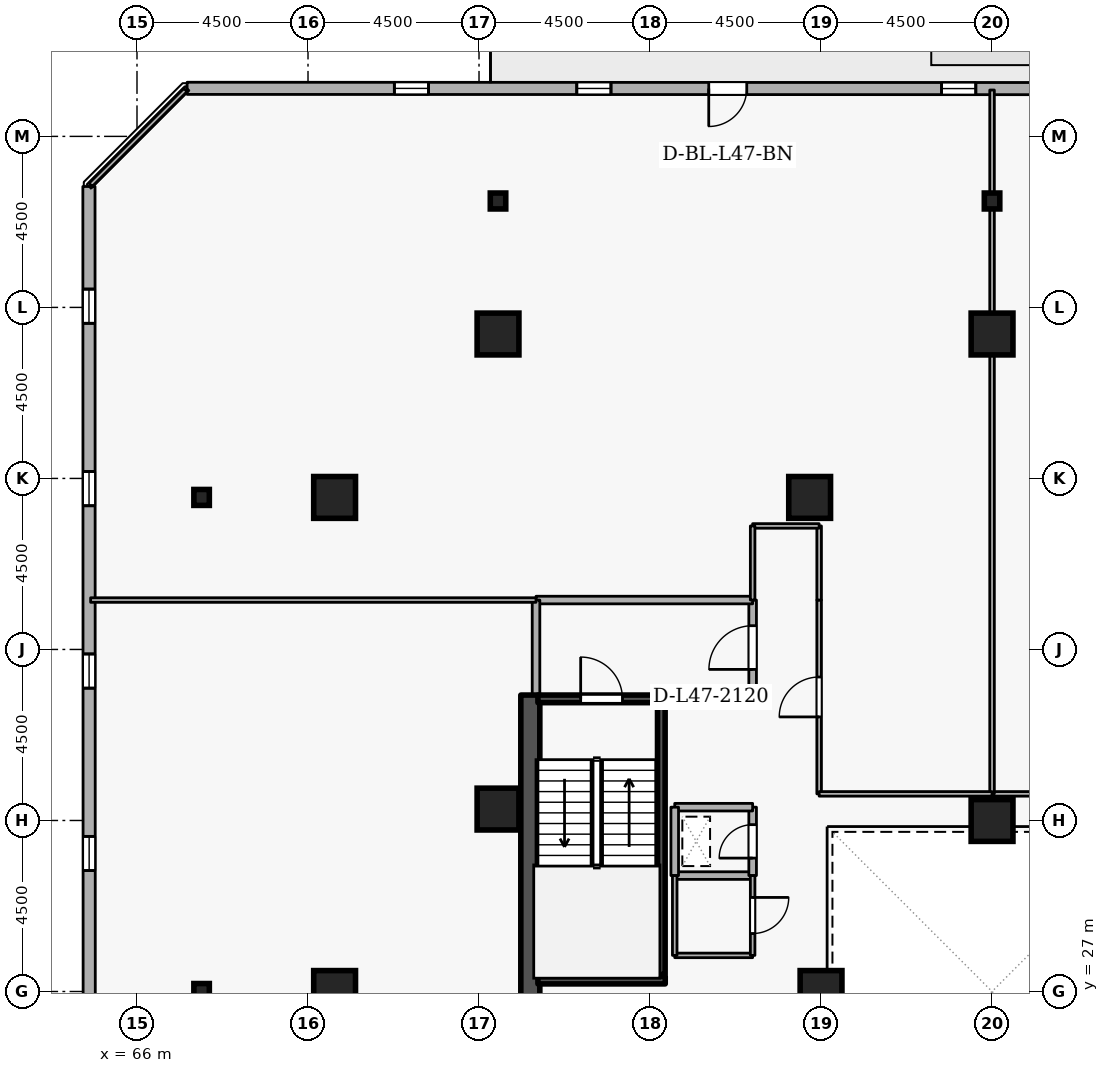
"""IFC4 building model, lengths in metres.
Left out: names, types, materials, properties, quantities, classifications, styles, units other than length and angle.
Written with IfcOpenShell. Run it as: python <this file> out.ifc"""

import sys

from ifc_helpers import new_model, si_unit, direction, frame, frame_2d, origin, origin_2d, place, context, subcontext, project, spatial, rectangle, i_section, extrude, element, fill, save


model = new_model("IFC4")
c1 = context("Model", 3, precision=1e-05, world=origin(), true_north=direction((0.0, 1.0)))
c2 = subcontext(c1, "Body", "Model", "MODEL_VIEW")
j1 = project(units=[si_unit("LENGTHUNIT", "METRE"), si_unit("PLANEANGLEUNIT", "RADIAN")], contexts=[c1])
p1 = place(None, origin())
s1 = spatial("IfcSite", under=j1, at=p1, CompositionType="ELEMENT")
p2 = place(p1, origin())
s2 = spatial("IfcBuilding", under=s1, at=p2, CompositionType="ELEMENT")
p3 = place(p2, frame((0.0, 0.0, 178.5)))
s3 = spatial("IfcBuildingStorey", under=s2, at=p3, CompositionType="ELEMENT", Elevation=178.5)
p4 = place(p3, frame((76.35, 19.2, 0.0), z_axis=(0.0, 0.0, 1.0), x_axis=(0.0, 1.0, 0.0)))
e1 = element("IfcWall", 1, at=p4, inside=s3, PredefinedType="SHEAR", context=c2, shape_type="SweptSolid", body=[
    extrude(rectangle(XDim=15.6, YDim=0.5, at=frame_2d((7.8, 0.0))), origin(), (0.0, 0.0, 1.0), 3.6),
])
for number, where, z_axis, x_axis in (
    (2, (88.5, 44.3, 0.0), (0.0, 0.0, 1.0), (1.0, 0.0, 0.0)),
    (3, (75.5, 44.3, 0.0), (0.0, 0.0, 1.0), (1.0, 0.0, 0.0)),
    (4, (71.2, 27.0, 0.0), (0.0, 0.0, 1.0), (1.0, 0.0, 0.0)),
    (5, (71.2, 40.0, 0.0), (0.0, 0.0, 1.0), (1.0, 0.0, 0.0)),
    (6, (83.7, 40.0, 0.0), (0.0, 0.0, 1.0), (1.0, 0.0, 0.0)),
    (7, (75.5, 31.8, 0.0), (0.0, 0.0, 1.0), (1.0, 0.0, 0.0)),
    (8, (84.0, 27.0, 0.0), (0.0, 0.0, 1.0), (1.0, 0.0, 0.0)),
    (9, (88.5, 31.5, 0.0), (0.0, 0.0, 1.0), (1.0, 0.0, 0.0)),
):
    element("IfcColumn", number, at=place(p3, frame(where, z_axis=z_axis, x_axis=x_axis)), inside=s3, PredefinedType="COLUMN", context=c2, shape_type="SweptSolid", body=[
        extrude(rectangle(XDim=1.1, YDim=1.1, at=origin_2d()), origin(), (0.0, 0.0, 1.0), 3.6),
    ])
for number, where, z_axis, x_axis in (
    (10, (88.5, 47.8, 0.0), (0.0, 0.0, 1.0), (1.0, 0.0, 0.0)),
    (11, (75.5, 47.8, 0.0), (0.0, 0.0, 1.0), (1.0, 0.0, 0.0)),
    (12, (67.7, 27.0, 0.0), (0.0, 0.0, 1.0), (1.0, 0.0, 0.0)),
    (13, (67.7, 40.0, 0.0), (0.0, 0.0, 1.0), (1.0, 0.0, 0.0)),
):
    element("IfcColumn", number, at=place(p3, frame(where, z_axis=z_axis, x_axis=x_axis)), inside=s3, PredefinedType="COLUMN", context=c2, shape_type="SweptSolid", body=[
        extrude(i_section(OverallWidth=0.407, OverallDepth=0.419, WebThickness=0.031, FlangeThickness=0.049, FilletRadius=0.015, at=origin_2d()), origin(), (0.0, 0.0, 1.0), 3.6),
    ])
p5 = place(p3, frame((100.372, 50.754, 0.0), z_axis=(0.0, 0.0, 1.0), x_axis=(-0.999999944762, 0.000332378036, 0.0)))
e14 = element("IfcWall", 14, at=p5, inside=s3, PredefinedType="STANDARD", context=c2, shape_type="SweptSolid", body=[
    extrude(rectangle(XDim=33.054, YDim=0.32, at=frame_2d((16.527, 0.0))), origin(), (0.0, 0.0, 1.0), 2.7),
])
p6 = place(p5, frame((18.327, 0.0, 0.0)))
e15 = element("IfcOpeningElement", 15, at=p6, cuts=e14, PredefinedType="OPENING", context=c2, shape_type="SweptSolid", body=[
    extrude(rectangle(XDim=1.0, YDim=2.08, at=frame_2d((0.5, 1.04))), frame((0.0, 0.17, 0.0), z_axis=(0.0, -1.0, 0.0), x_axis=(1.0, 0.0, 0.0)), (0.0, 0.0, 1.0), 0.34),
])
p7 = place(p5, frame((2.7, 0.0, 0.72)))
e16 = element("IfcOpeningElement", 16, at=p7, cuts=e14, PredefinedType="OPENING", context=c2, shape_type="SweptSolid", body=[
    extrude(rectangle(XDim=0.9, YDim=1.75, at=frame_2d((0.45, 0.875))), frame((0.0, 0.17, 0.0), z_axis=(0.0, -1.0, 0.0), x_axis=(1.0, 0.0, 0.0)), (0.0, 0.0, 1.0), 0.34),
])
p8 = place(p5, frame((7.5, 0.0, 0.72)))
e17 = element("IfcOpeningElement", 17, at=p8, cuts=e14, PredefinedType="OPENING", context=c2, shape_type="SweptSolid", body=[
    extrude(rectangle(XDim=0.9, YDim=1.75, at=frame_2d((0.45, 0.875))), frame((0.0, 0.17, 0.0), z_axis=(0.0, -1.0, 0.0), x_axis=(1.0, 0.0, 0.0)), (0.0, 0.0, 1.0), 0.34),
])
p9 = place(p5, frame((12.3, 0.0, 0.72)))
e18 = element("IfcOpeningElement", 18, at=p9, cuts=e14, PredefinedType="OPENING", context=c2, shape_type="SweptSolid", body=[
    extrude(rectangle(XDim=0.9, YDim=1.75, at=frame_2d((0.45, 0.875))), frame((0.0, 0.17, 0.0), z_axis=(0.0, -1.0, 0.0), x_axis=(1.0, 0.0, 0.0)), (0.0, 0.0, 1.0), 0.34),
])
p10 = place(p5, frame((21.9, 0.0, 0.72)))
e19 = element("IfcOpeningElement", 19, at=p10, cuts=e14, PredefinedType="OPENING", context=c2, shape_type="SweptSolid", body=[
    extrude(rectangle(XDim=0.9, YDim=1.75, at=frame_2d((0.45, 0.875))), frame((0.0, 0.17, 0.0), z_axis=(0.0, -1.0, 0.0), x_axis=(1.0, 0.0, 0.0)), (0.0, 0.0, 1.0), 0.34),
])
p11 = place(p5, frame((26.7, 0.0, 0.72)))
e20 = element("IfcOpeningElement", 20, at=p11, cuts=e14, PredefinedType="OPENING", context=c2, shape_type="SweptSolid", body=[
    extrude(rectangle(XDim=0.9, YDim=1.75, at=frame_2d((0.45, 0.875))), frame((0.0, 0.17, 0.0), z_axis=(0.0, -1.0, 0.0), x_axis=(1.0, 0.0, 0.0)), (0.0, 0.0, 1.0), 0.34),
])
p12 = place(p3, frame((64.735, 48.181, 0.0), z_axis=(0.0, 0.0, 1.0), x_axis=(0.000332378036, -0.999999944762, 0.0)))
e21 = element("IfcWall", 21, at=p12, inside=s3, PredefinedType="STANDARD", context=c2, shape_type="SweptSolid", body=[
    extrude(rectangle(XDim=33.054, YDim=0.32, at=frame_2d((16.527, 0.0))), origin(), (0.0, 0.0, 1.0), 2.7),
])
p13 = place(p12, frame((2.7, 0.0, 0.72)))
e22 = element("IfcOpeningElement", 22, at=p13, cuts=e21, PredefinedType="OPENING", context=c2, shape_type="SweptSolid", body=[
    extrude(rectangle(XDim=0.9, YDim=1.75, at=frame_2d((0.45, 0.875))), frame((0.0, 0.17, 0.0), z_axis=(0.0, -1.0, 0.0), x_axis=(1.0, 0.0, 0.0)), (0.0, 0.0, 1.0), 0.34),
])
p14 = place(p12, frame((7.5, 0.0, 0.72)))
e23 = element("IfcOpeningElement", 23, at=p14, cuts=e21, PredefinedType="OPENING", context=c2, shape_type="SweptSolid", body=[
    extrude(rectangle(XDim=0.9, YDim=1.75, at=frame_2d((0.45, 0.875))), frame((0.0, 0.17, 0.0), z_axis=(0.0, -1.0, 0.0), x_axis=(1.0, 0.0, 0.0)), (0.0, 0.0, 1.0), 0.34),
])
p15 = place(p12, frame((12.3, 0.0, 0.72)))
e24 = element("IfcOpeningElement", 24, at=p15, cuts=e21, PredefinedType="OPENING", context=c2, shape_type="SweptSolid", body=[
    extrude(rectangle(XDim=0.9, YDim=1.75, at=frame_2d((0.45, 0.875))), frame((0.0, 0.17, 0.0), z_axis=(0.0, -1.0, 0.0), x_axis=(1.0, 0.0, 0.0)), (0.0, 0.0, 1.0), 0.34),
])
p16 = place(p12, frame((17.1, 0.0, 0.72)))
e25 = element("IfcOpeningElement", 25, at=p16, cuts=e21, PredefinedType="OPENING", context=c2, shape_type="SweptSolid", body=[
    extrude(rectangle(XDim=0.9, YDim=1.75, at=frame_2d((0.45, 0.875))), frame((0.0, 0.17, 0.0), z_axis=(0.0, -1.0, 0.0), x_axis=(1.0, 0.0, 0.0)), (0.0, 0.0, 1.0), 0.34),
])
p17 = place(p12, frame((21.9, 0.0, 0.72)))
e26 = element("IfcOpeningElement", 26, at=p17, cuts=e21, PredefinedType="OPENING", context=c2, shape_type="SweptSolid", body=[
    extrude(rectangle(XDim=0.9, YDim=1.75, at=frame_2d((0.45, 0.875))), frame((0.0, 0.17, 0.0), z_axis=(0.0, -1.0, 0.0), x_axis=(1.0, 0.0, 0.0)), (0.0, 0.0, 1.0), 0.34),
])
p18 = place(p12, frame((26.7, 0.0, 0.72)))
e27 = element("IfcOpeningElement", 27, at=p18, cuts=e21, PredefinedType="OPENING", context=c2, shape_type="SweptSolid", body=[
    extrude(rectangle(XDim=0.9, YDim=1.75, at=frame_2d((0.45, 0.875))), frame((0.0, 0.17, 0.0), z_axis=(0.0, -1.0, 0.0), x_axis=(1.0, 0.0, 0.0)), (0.0, 0.0, 1.0), 0.34),
])
p19 = place(p3, frame((76.55, 34.7, 0.0), z_axis=(0.0, 0.0, 1.0), x_axis=(1.0, 0.0, 0.0)))
e28 = element("IfcWall", 28, at=p19, inside=s3, PredefinedType="SHEAR", context=c2, shape_type="SweptSolid", body=[
    extrude(rectangle(XDim=3.35, YDim=0.2, at=frame_2d((1.675, 0.0))), origin(), (0.0, 0.0, 1.0), 3.6),
])
p20 = place(p19, frame((1.125, 0.0, 0.0)))
e29 = element("IfcOpeningElement", 29, at=p20, cuts=e28, PredefinedType="OPENING", context=c2, shape_type="SweptSolid", body=[
    extrude(rectangle(XDim=1.1, YDim=2.1, at=frame_2d((0.55, 1.05))), frame((0.0, 0.11, 0.0), z_axis=(0.0, -1.0, 0.0), x_axis=(1.0, 0.0, 0.0)), (0.0, 0.0, 1.0), 0.22),
])
p21 = place(p3, frame((79.9, 27.3, 0.0), z_axis=(0.0, 0.0, 1.0), x_axis=(-1.0, 0.0, 0.0)))
e30 = element("IfcWall", 30, at=p21, inside=s3, PredefinedType="SHEAR", context=c2, shape_type="SweptSolid", body=[
    extrude(rectangle(XDim=3.35, YDim=0.2, at=frame_2d((1.675, 0.0))), origin(), (0.0, 0.0, 1.0), 3.6),
])
p22 = place(p3, frame((79.797, 27.45, 0.0), z_axis=(0.0, 0.0, 1.0), x_axis=(0.0, 1.0, 0.0)))
e31 = element("IfcWall", 31, at=p22, inside=s3, PredefinedType="SHEAR", context=c2, shape_type="SweptSolid", body=[
    extrude(rectangle(XDim=7.1, YDim=0.2, at=frame_2d((3.55, 0.0))), origin(), (0.0, 0.0, 1.0), 3.6),
])
p23 = place(p3, frame((79.9, 34.8, 0.0), z_axis=(0.0, 0.0, 1.0), x_axis=(1.0, 0.0, 0.0)))
e32 = element("IfcWall", 32, at=p23, inside=s3, PredefinedType="STANDARD", context=c2, shape_type="SweptSolid", body=[
    extrude(rectangle(XDim=2.3, YDim=0.2, at=frame_2d((1.15, 0.0))), origin(), (0.0, 0.0, 1.0), 2.545),
])
p24 = place(p3, frame((82.2, 34.8, 0.0), z_axis=(0.0, 0.0, 1.0), x_axis=(0.0, 1.0, 0.0)))
e33 = element("IfcWall", 33, at=p24, inside=s3, PredefinedType="STANDARD", context=c2, shape_type="SweptSolid", body=[
    extrude(rectangle(XDim=2.5, YDim=0.2, at=frame_2d((1.25, 0.0))), origin(), (0.0, 0.0, 1.0), 3.34),
])
p25 = place(p24, frame((0.675, 0.0, 0.0)))
e34 = element("IfcOpeningElement", 34, at=p25, cuts=e33, PredefinedType="OPENING", context=c2, shape_type="SweptSolid", body=[
    extrude(rectangle(XDim=1.15, YDim=2.1, at=frame_2d((0.575, 1.05))), frame((0.0, 0.11, 0.0), z_axis=(0.0, -1.0, 0.0), x_axis=(1.0, 0.0, 0.0)), (0.0, 0.0, 1.0), 0.22),
])
p26 = place(p3, frame((82.2, 37.3, 0.0), z_axis=(0.0, 0.0, 1.0), x_axis=(-1.0, 0.0, 0.0)))
e35 = element("IfcWall", 35, at=p26, inside=s3, PredefinedType="STANDARD", context=c2, shape_type="SweptSolid", body=[
    extrude(rectangle(XDim=5.7, YDim=0.2, at=frame_2d((2.85, 0.0))), origin(), (0.0, 0.0, 1.0), 3.34),
])
p27 = place(p3, frame((76.5, 37.3, 0.0), z_axis=(0.0, 0.0, 1.0), x_axis=(0.0, -1.0, 0.0)))
e36 = element("IfcWall", 36, at=p27, inside=s3, PredefinedType="STANDARD", context=c2, shape_type="SweptSolid", body=[
    extrude(rectangle(XDim=2.5, YDim=0.2, at=frame_2d((1.25, 0.0))), origin(), (0.0, 0.0, 1.0), 3.34),
])
p28 = place(p3, frame((80.15, 30.05, 0.0), z_axis=(0.0, 0.0, 1.0), x_axis=(1.0, 0.0, 0.0)))
e37 = element("IfcWall", 37, at=p28, inside=s3, PredefinedType="STANDARD", context=c2, shape_type="SweptSolid", body=[
    extrude(rectangle(XDim=2.05, YDim=0.2, at=frame_2d((1.025, 0.0))), origin(), (0.0, 0.0, 1.0), 3.34),
])
p29 = place(p3, frame((82.2, 30.05, 0.0), z_axis=(0.0, 0.0, 1.0), x_axis=(0.0, 1.0, 0.0)))
e38 = element("IfcWall", 38, at=p29, inside=s3, PredefinedType="STANDARD", context=c2, shape_type="SweptSolid", body=[
    extrude(rectangle(XDim=1.8, YDim=0.2, at=frame_2d((0.9, 0.0))), origin(), (0.0, 0.0, 1.0), 3.34),
])
p30 = place(p29, frame((0.46, 0.0, 0.0)))
e39 = element("IfcOpeningElement", 39, at=p30, cuts=e38, PredefinedType="OPENING", context=c2, shape_type="SweptSolid", body=[
    extrude(rectangle(XDim=0.88, YDim=2.04, at=frame_2d((0.44, 1.02))), frame((0.0, 0.11, 0.0), z_axis=(0.0, -1.0, 0.0), x_axis=(1.0, 0.0, 0.0)), (0.0, 0.0, 1.0), 0.22),
])
p31 = place(p3, frame((82.2, 31.85, 0.0), z_axis=(0.0, 0.0, 1.0), x_axis=(-1.0, 0.0, 0.0)))
e40 = element("IfcWall", 40, at=p31, inside=s3, PredefinedType="STANDARD", context=c2, shape_type="SweptSolid", body=[
    extrude(rectangle(XDim=2.05, YDim=0.2, at=frame_2d((1.025, 0.0))), origin(), (0.0, 0.0, 1.0), 3.34),
])
p32 = place(p3, frame((80.15, 31.85, 0.0), z_axis=(0.0, 0.0, 1.0), x_axis=(0.0, -1.0, 0.0)))
e41 = element("IfcWall", 41, at=p32, inside=s3, PredefinedType="STANDARD", context=c2, shape_type="SweptSolid", body=[
    extrude(rectangle(XDim=1.8, YDim=0.2, at=frame_2d((0.9, 0.0))), origin(), (0.0, 0.0, 1.0), 3.34),
])
p33 = place(p3, frame((82.2, 27.95, 0.0), z_axis=(0.0, 0.0, 1.0), x_axis=(-1.0, 0.0, 0.0)))
e42 = element("IfcWall", 42, at=p33, inside=s3, PredefinedType="PARTITIONING", context=c2, shape_type="SweptSolid", body=[
    extrude(rectangle(XDim=2.05, YDim=0.12, at=frame_2d((1.025, 0.0))), origin(), (0.0, 0.0, 1.0), 3.34),
])
p34 = place(p3, frame((80.15, 27.95, 0.0), z_axis=(0.0, 0.0, 1.0), x_axis=(0.0, 1.0, 0.0)))
e43 = element("IfcWall", 43, at=p34, inside=s3, PredefinedType="PARTITIONING", context=c2, shape_type="SweptSolid", body=[
    extrude(rectangle(XDim=2.1, YDim=0.12, at=frame_2d((1.05, 0.0))), origin(), (0.0, 0.0, 1.0), 3.34),
])
p35 = place(p3, frame((82.2, 30.05, 0.0), z_axis=(0.0, 0.0, 1.0), x_axis=(0.0, -1.0, 0.0)))
e44 = element("IfcWall", 44, at=p35, inside=s3, PredefinedType="PARTITIONING", context=c2, shape_type="SweptSolid", body=[
    extrude(rectangle(XDim=2.1, YDim=0.12, at=frame_2d((1.05, 0.0))), origin(), (0.0, 0.0, 1.0), 3.34),
])
p36 = place(p35, frame((0.575, 0.0, 0.0)))
e45 = element("IfcOpeningElement", 45, at=p36, cuts=e44, PredefinedType="OPENING", context=c2, shape_type="SweptSolid", body=[
    extrude(rectangle(XDim=0.95, YDim=2.1, at=frame_2d((0.475, 1.05))), frame((0.0, 0.07, 0.0), z_axis=(0.0, -1.0, 0.0), x_axis=(1.0, 0.0, 0.0)), (0.0, 0.0, 1.0), 0.14),
])
p37 = place(p3, frame((93.05, 32.2, 0.0), z_axis=(0.0, 0.0, 1.0), x_axis=(-1.0, 0.0, 0.0)))
e46 = element("IfcWall", 46, at=p37, inside=s3, PredefinedType="PARTITIONING", context=c2, shape_type="SweptSolid", body=[
    extrude(rectangle(XDim=4.55, YDim=0.12, at=frame_2d((2.275, 0.0))), origin(), (0.0, 0.0, 1.0), 3.34),
])
p38 = place(p3, frame((88.5, 32.2, 0.0), z_axis=(0.0, 0.0, 1.0), x_axis=(0.0, 1.0, 0.0)))
e47 = element("IfcWall", 47, at=p38, inside=s3, PredefinedType="PARTITIONING", context=c2, shape_type="SweptSolid", body=[
    extrude(rectangle(XDim=18.52, YDim=0.12, at=frame_2d((9.26, 0.0))), origin(), (0.0, 0.0, 1.0), 2.932),
])
p39 = place(p3, frame((83.95, 32.2, 0.0), z_axis=(0.0, 0.0, 1.0), x_axis=(0.0, 1.0, 0.0)))
e48 = element("IfcWall", 48, at=p39, inside=s3, PredefinedType="PARTITIONING", context=c2, shape_type="SweptSolid", body=[
    extrude(rectangle(XDim=5.1, YDim=0.12, at=frame_2d((2.55, 0.0))), origin(), (0.0, 0.0, 1.0), 3.34),
])
p40 = place(p39, frame((2.025, 0.0, 0.0)))
e49 = element("IfcOpeningElement", 49, at=p40, cuts=e48, PredefinedType="OPENING", context=c2, shape_type="SweptSolid", body=[
    extrude(rectangle(XDim=1.05, YDim=2.1, at=frame_2d((0.525, 1.05))), frame((0.0, 0.07, 0.0), z_axis=(0.0, -1.0, 0.0), x_axis=(1.0, 0.0, 0.0)), (0.0, 0.0, 1.0), 0.14),
])
p41 = place(p3, frame((83.95, 37.3, 0.0), z_axis=(0.0, 0.0, 1.0), x_axis=(0.0, 1.0, 0.0)))
e50 = element("IfcWall", 50, at=p41, inside=s3, PredefinedType="PARTITIONING", context=c2, shape_type="SweptSolid", body=[
    extrude(rectangle(XDim=1.95, YDim=0.12, at=frame_2d((0.975, 0.0))), origin(), (0.0, 0.0, 1.0), 3.34),
])
p42 = place(p3, frame((83.95, 39.25, 0.0), z_axis=(0.0, 0.0, 1.0), x_axis=(-1.0, 0.0, 0.0)))
e51 = element("IfcWall", 51, at=p42, inside=s3, PredefinedType="PARTITIONING", context=c2, shape_type="SweptSolid", body=[
    extrude(rectangle(XDim=1.75, YDim=0.12, at=frame_2d((0.875, 0.0))), origin(), (0.0, 0.0, 1.0), 3.34),
])
p43 = place(p3, frame((82.2, 39.25, 0.0), z_axis=(0.0, 0.0, 1.0), x_axis=(0.0, -1.0, 0.0)))
e52 = element("IfcWall", 52, at=p43, inside=s3, PredefinedType="PARTITIONING", context=c2, shape_type="SweptSolid", body=[
    extrude(rectangle(XDim=1.95, YDim=0.12, at=frame_2d((0.975, 0.0))), origin(), (0.0, 0.0, 1.0), 3.34),
])
p44 = place(p3, frame((76.5, 37.3, 0.0), z_axis=(0.0, 0.0, 1.0), x_axis=(-1.0, 0.0, 0.0)))
e53 = element("IfcWall", 53, at=p44, inside=s3, PredefinedType="PARTITIONING", context=c2, shape_type="SweptSolid", body=[
    extrude(rectangle(XDim=11.72, YDim=0.12, at=frame_2d((5.86, 0.0))), origin(), (0.0, 0.0, 1.0), 3.34),
])
p45 = place(p3, frame((64.78, 48.225, 0.0), z_axis=(0.0, 0.0, 1.0), x_axis=(0.707106781187, 0.707106781187, 0.0)))
e54 = element("IfcWall", 54, at=p45, inside=s3, PredefinedType="PARTITIONING", context=c2, shape_type="SweptSolid", body=[
    extrude(rectangle(XDim=3.528, YDim=0.12, at=frame_2d((1.764, 0.0))), origin(), (0.0, 0.0, 1.0), 3.34),
])
p46 = place(p3, frame((88.5, 32.2, 0.0), z_axis=(0.0, 0.0, 1.0), x_axis=(-1.0, 0.0, 0.0)))
e55 = element("IfcWall", 55, at=p46, inside=s3, PredefinedType="PARTITIONING", context=c2, shape_type="SweptSolid", body=[
    extrude(rectangle(XDim=4.55, YDim=0.12, at=frame_2d((2.275, 0.0))), origin(), (0.0, 0.0, 1.0), 3.34),
])
p47 = place(p6, origin())
e56 = element("IfcDoor", 56, at=p47, inside=s3, OperationType="SINGLE_SWING_RIGHT", PredefinedType="DOOR", context=c2, shape_type="SweptSolid", body=[
    extrude(rectangle(XDim=1.0, YDim=2.08, at=frame_2d((0.5, 1.04))), frame((0.0, 0.025, 0.0), z_axis=(0.0, -1.0, 0.0), x_axis=(1.0, 0.0, 0.0)), (0.0, 0.0, 1.0), 0.05),
])
fill(e15, e56)
p48 = place(p9, origin())
e57 = element("IfcWindow", 57, at=p48, inside=s3, PartitioningType="SINGLE_PANEL", PredefinedType="WINDOW", context=c2, shape_type="SweptSolid", body=[
    extrude(rectangle(XDim=0.9, YDim=1.75, at=frame_2d((0.45, 0.875))), frame((0.0, 0.03, 0.0), z_axis=(0.0, -1.0, 0.0), x_axis=(1.0, 0.0, 0.0)), (0.0, 0.0, 1.0), 0.06),
])
fill(e18, e57)
p49 = place(p10, origin())
e58 = element("IfcWindow", 58, at=p49, inside=s3, PartitioningType="SINGLE_PANEL", PredefinedType="WINDOW", context=c2, shape_type="SweptSolid", body=[
    extrude(rectangle(XDim=0.9, YDim=1.75, at=frame_2d((0.45, 0.875))), frame((0.0, 0.03, 0.0), z_axis=(0.0, -1.0, 0.0), x_axis=(1.0, 0.0, 0.0)), (0.0, 0.0, 1.0), 0.06),
])
fill(e19, e58)
p50 = place(p11, origin())
e59 = element("IfcWindow", 59, at=p50, inside=s3, PartitioningType="SINGLE_PANEL", PredefinedType="WINDOW", context=c2, shape_type="SweptSolid", body=[
    extrude(rectangle(XDim=0.9, YDim=1.75, at=frame_2d((0.45, 0.875))), frame((0.0, 0.03, 0.0), z_axis=(0.0, -1.0, 0.0), x_axis=(1.0, 0.0, 0.0)), (0.0, 0.0, 1.0), 0.06),
])
fill(e20, e59)
p51 = place(p13, origin())
e60 = element("IfcWindow", 60, at=p51, inside=s3, PartitioningType="SINGLE_PANEL", PredefinedType="WINDOW", context=c2, shape_type="SweptSolid", body=[
    extrude(rectangle(XDim=0.9, YDim=1.75, at=frame_2d((0.45, 0.875))), frame((0.0, 0.03, 0.0), z_axis=(0.0, -1.0, 0.0), x_axis=(1.0, 0.0, 0.0)), (0.0, 0.0, 1.0), 0.06),
])
fill(e22, e60)
p52 = place(p14, origin())
e61 = element("IfcWindow", 61, at=p52, inside=s3, PartitioningType="SINGLE_PANEL", PredefinedType="WINDOW", context=c2, shape_type="SweptSolid", body=[
    extrude(rectangle(XDim=0.9, YDim=1.75, at=frame_2d((0.45, 0.875))), frame((0.0, 0.03, 0.0), z_axis=(0.0, -1.0, 0.0), x_axis=(1.0, 0.0, 0.0)), (0.0, 0.0, 1.0), 0.06),
])
fill(e23, e61)
p53 = place(p15, origin())
e62 = element("IfcWindow", 62, at=p53, inside=s3, PartitioningType="SINGLE_PANEL", PredefinedType="WINDOW", context=c2, shape_type="SweptSolid", body=[
    extrude(rectangle(XDim=0.9, YDim=1.75, at=frame_2d((0.45, 0.875))), frame((0.0, 0.03, 0.0), z_axis=(0.0, -1.0, 0.0), x_axis=(1.0, 0.0, 0.0)), (0.0, 0.0, 1.0), 0.06),
])
fill(e24, e62)
p54 = place(p16, origin())
e63 = element("IfcWindow", 63, at=p54, inside=s3, PartitioningType="SINGLE_PANEL", PredefinedType="WINDOW", context=c2, shape_type="SweptSolid", body=[
    extrude(rectangle(XDim=0.9, YDim=1.75, at=frame_2d((0.45, 0.875))), frame((0.0, 0.03, 0.0), z_axis=(0.0, -1.0, 0.0), x_axis=(1.0, 0.0, 0.0)), (0.0, 0.0, 1.0), 0.06),
])
fill(e25, e63)
p55 = place(p20, origin())
e64 = element("IfcDoor", 64, at=p55, inside=s3, OperationType="SINGLE_SWING_LEFT", PredefinedType="DOOR", context=c2, shape_type="SweptSolid", body=[
    extrude(rectangle(XDim=1.1, YDim=2.1, at=frame_2d((0.55, 1.05))), frame((0.0, 0.025, 0.0), z_axis=(0.0, -1.0, 0.0), x_axis=(1.0, 0.0, 0.0)), (0.0, 0.0, 1.0), 0.05),
])
fill(e29, e64)
p56 = place(p25, origin())
e65 = element("IfcDoor", 65, at=p56, inside=s3, OperationType="SINGLE_SWING_LEFT", PredefinedType="DOOR", context=c2, shape_type="SweptSolid", body=[
    extrude(rectangle(XDim=1.15, YDim=2.1, at=frame_2d((0.575, 1.05))), frame((0.0, 0.025, 0.0), z_axis=(0.0, -1.0, 0.0), x_axis=(1.0, 0.0, 0.0)), (0.0, 0.0, 1.0), 0.05),
])
fill(e34, e65)
p57 = place(p30, origin())
e66 = element("IfcDoor", 66, at=p57, inside=s3, OperationType="SINGLE_SWING_LEFT", PredefinedType="DOOR", context=c2, shape_type="SweptSolid", body=[
    extrude(rectangle(XDim=0.88, YDim=2.04, at=frame_2d((0.44, 1.02))), frame((0.0, 0.025, 0.0), z_axis=(0.0, -1.0, 0.0), x_axis=(1.0, 0.0, 0.0)), (0.0, 0.0, 1.0), 0.05),
])
fill(e39, e66)
p58 = place(p36, origin())
e67 = element("IfcDoor", 67, at=p58, inside=s3, OperationType="SINGLE_SWING_LEFT", PredefinedType="DOOR", context=c2, shape_type="SweptSolid", body=[
    extrude(rectangle(XDim=0.95, YDim=2.1, at=frame_2d((0.475, 1.05))), frame((0.0, 0.025, 0.0), z_axis=(0.0, -1.0, 0.0), x_axis=(1.0, 0.0, 0.0)), (0.0, 0.0, 1.0), 0.05),
])
fill(e45, e67)
p59 = place(p40, origin())
e68 = element("IfcDoor", 68, at=p59, inside=s3, OperationType="SINGLE_SWING_LEFT", PredefinedType="DOOR", context=c2, shape_type="SweptSolid", body=[
    extrude(rectangle(XDim=1.05, YDim=2.1, at=frame_2d((0.525, 1.05))), frame((0.0, 0.025, 0.0), z_axis=(0.0, -1.0, 0.0), x_axis=(1.0, 0.0, 0.0)), (0.0, 0.0, 1.0), 0.05),
])
fill(e49, e68)
save(model, sys.argv[1])
